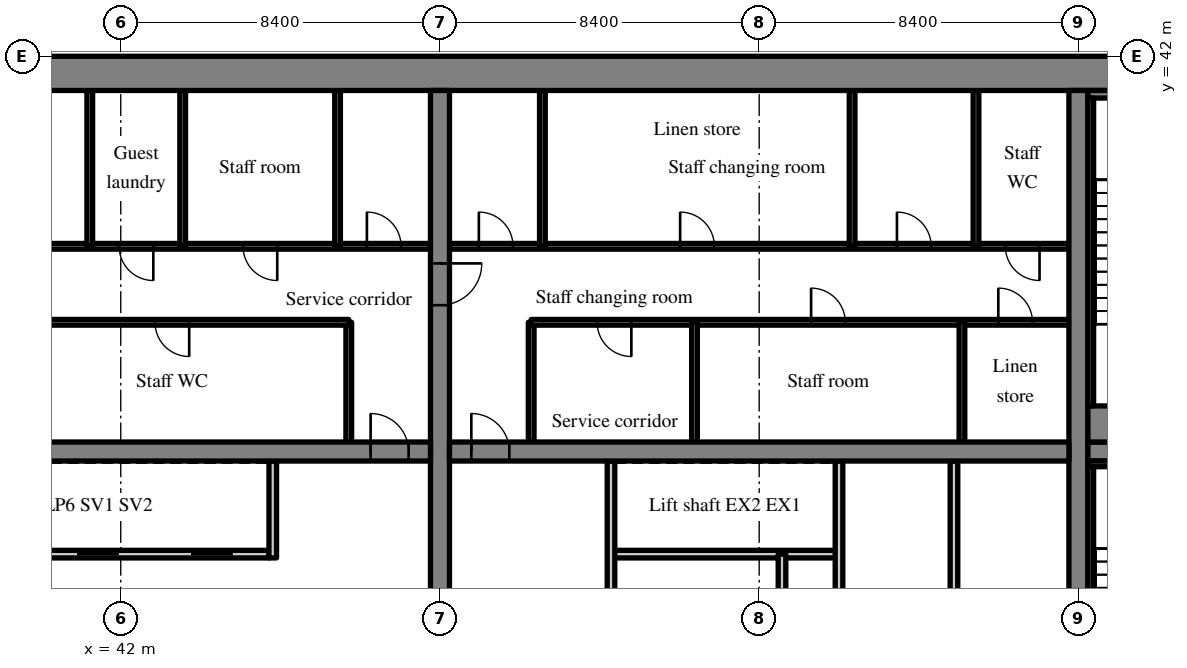
"""IFC4 building model, lengths in metres.
Left out: names, types, materials, properties, quantities, classifications, styles, units other than length and angle.
Written with IfcOpenShell. Run it as: python <this file> out.ifc"""

import sys

from ifc_helpers import new_model, si_unit, direction, frame, frame_2d, origin, place, context, subcontext, project, spatial, rectangle, extrude, source, transform, mapped, element, fill, save


model = new_model("IFC4")
c1 = context("Model", 3, precision=1e-05, world=origin(), true_north=direction((0.0, 1.0)))
c2 = subcontext(c1, "Body", "Model", "MODEL_VIEW")
j1 = project(units=[si_unit("LENGTHUNIT", "METRE"), si_unit("PLANEANGLEUNIT", "RADIAN")], contexts=[c1])
p1 = place(None, origin())
s1 = spatial("IfcSite", under=j1, at=p1, CompositionType="ELEMENT")
p2 = place(p1, origin())
s2 = spatial("IfcBuilding", under=s1, at=p2, CompositionType="ELEMENT")
p3 = place(p2, frame((0.0, 0.0, 95.2)))
s3 = spatial("IfcBuildingStorey", under=s2, at=p3, CompositionType="ELEMENT", Elevation=95.2)
m1 = source(origin(), c2, "Body", "SweptSolid", [
    extrude(rectangle(XDim=50.4, YDim=0.9, at=frame_2d((25.2, 0.0))), origin(), (0.0, 0.0, 1.0), 3.52),
])
p4 = place(p3, frame((25.2, 41.55, 0.0), z_axis=(0.0, 0.0, 1.0), x_axis=(1.0, 0.0, 0.0)))
e1 = element("IfcWall", 1, at=p4, inside=s3, PredefinedType="SHEAR", context=c2, shape_type="MappedRepresentation", body=[
    mapped(m1, transform((0.0, 0.0, 0.0), scale=1.0)),
])
m2 = source(origin(), c2, "Body", "SweptSolid", [
    extrude(rectangle(XDim=18.2, YDim=0.5, at=frame_2d((9.1, 0.0))), origin(), (0.0, 0.0, 1.0), 3.52),
])
p5 = place(p3, frame((50.4, 22.9, 0.0), z_axis=(0.0, 0.0, 1.0), x_axis=(0.0, 1.0, 0.0)))
e2 = element("IfcWall", 2, at=p5, inside=s3, PredefinedType="SHEAR", context=c2, shape_type="MappedRepresentation", body=[
    mapped(m2, transform((0.0, 0.0, 0.0), scale=1.0)),
])
m3 = source(origin(), c2, "Body", "SweptSolid", [
    extrude(rectangle(XDim=1.1, YDim=2.1, at=frame_2d((0.55, 1.05))), frame((0.0, 0.26, 0.0), z_axis=(0.0, -1.0, 0.0), x_axis=(1.0, 0.0, 0.0)), (0.0, 0.0, 1.0), 0.52),
])
p6 = place(p5, frame((12.55, 0.0, 0.0)))
e3 = element("IfcOpeningElement", 3, at=p6, cuts=e2, PredefinedType="OPENING", context=c2, shape_type="MappedRepresentation", body=[
    mapped(m3, transform((0.0, 0.0, 0.0), scale=1.0)),
])
p7 = place(p3, frame((67.2, 22.9, 0.0), z_axis=(0.0, 0.0, 1.0), x_axis=(0.0, 1.0, 0.0)))
e4 = element("IfcWall", 4, at=p7, inside=s3, PredefinedType="SHEAR", context=c2, shape_type="MappedRepresentation", body=[
    mapped(m2, transform((0.0, 0.0, 0.0), scale=1.0)),
])
m4 = source(origin(), c2, "Body", "SweptSolid", [
    extrude(rectangle(XDim=16.3, YDim=0.5, at=frame_2d((8.15, 0.0))), origin(), (0.0, 0.0, 1.0), 3.52),
])
p8 = place(p3, frame((33.85, 31.6, 0.0), z_axis=(0.0, 0.0, 1.0), x_axis=(1.0, 0.0, 0.0)))
e5 = element("IfcWall", 5, at=p8, inside=s3, PredefinedType="SHEAR", context=c2, shape_type="MappedRepresentation", body=[
    mapped(m4, transform((0.0, 0.0, 0.0), scale=1.0)),
])
m5 = source(origin(), c2, "Body", "SweptSolid", [
    extrude(rectangle(XDim=1.0, YDim=2.1, at=frame_2d((0.5, 1.05))), frame((0.0, 0.26, 0.0), z_axis=(0.0, -1.0, 0.0), x_axis=(1.0, 0.0, 0.0)), (0.0, 0.0, 1.0), 0.52),
])
p9 = place(p8, frame((14.725, 0.0, 0.0)))
e6 = element("IfcOpeningElement", 6, at=p9, cuts=e5, PredefinedType="OPENING", context=c2, shape_type="MappedRepresentation", body=[
    mapped(m5, transform((0.0, 0.0, 0.0), scale=1.0)),
])
m6 = source(origin(), c2, "Body", "SweptSolid", [
    extrude(rectangle(XDim=16.3, YDim=0.5, at=frame_2d((8.15, 0.0))), origin(), (0.0, 0.0, 1.0), 3.52),
])
p10 = place(p3, frame((50.65, 31.6, 0.0), z_axis=(0.0, 0.0, 1.0), x_axis=(1.0, 0.0, 0.0)))
e7 = element("IfcWall", 7, at=p10, inside=s3, PredefinedType="SHEAR", context=c2, shape_type="MappedRepresentation", body=[
    mapped(m6, transform((0.0, 0.0, 0.0), scale=1.0)),
])
p11 = place(p10, frame((0.575, 0.0, 0.0)))
e8 = element("IfcOpeningElement", 8, at=p11, cuts=e7, PredefinedType="OPENING", context=c2, shape_type="MappedRepresentation", body=[
    mapped(m5, transform((0.0, 0.0, 0.0), scale=1.0)),
])
m7 = source(origin(), c2, "Body", "SweptSolid", [
    extrude(rectangle(XDim=7.25, YDim=0.5, at=frame_2d((3.625, 0.0))), origin(), (0.0, 0.0, 1.0), 3.52),
])
p12 = place(p3, frame((67.45, 31.6, 0.0), z_axis=(0.0, 0.0, 1.0), x_axis=(1.0, 0.0, 0.0)))
e9 = element("IfcWall", 9, at=p12, inside=s3, PredefinedType="SHEAR", context=c2, shape_type="MappedRepresentation", body=[
    mapped(m7, transform((0.0, 0.0, 0.0), scale=1.0)),
])
p13 = place(p12, frame((5.575, 0.0, 0.0)))
e10 = element("IfcOpeningElement", 10, at=p13, cuts=e9, PredefinedType="OPENING", context=c2, shape_type="MappedRepresentation", body=[
    mapped(m3, transform((0.0, 0.0, 0.0), scale=1.0)),
])
m8 = source(origin(), c2, "Body", "SweptSolid", [
    extrude(rectangle(XDim=12.05, YDim=0.2, at=frame_2d((6.025, 0.0))), origin(), (0.0, 0.0, 1.0), 3.52),
])
p14 = place(p3, frame((33.85, 28.9, 0.0), z_axis=(0.0, 0.0, 1.0), x_axis=(1.0, 0.0, 0.0)))
e11 = element("IfcWall", 11, at=p14, inside=s3, PredefinedType="SOLIDWALL", context=c2, shape_type="MappedRepresentation", body=[
    mapped(m8, transform((0.0, 0.0, 0.0), scale=1.0)),
])
m9 = source(origin(), c2, "Body", "SweptSolid", [
    extrude(rectangle(XDim=1.1, YDim=2.1, at=frame_2d((0.55, 1.05))), frame((0.0, 0.11, 0.0), z_axis=(0.0, -1.0, 0.0), x_axis=(1.0, 0.0, 0.0)), (0.0, 0.0, 1.0), 0.22),
])
p15 = place(p14, frame((1.0, 0.0, 0.0)))
e12 = element("IfcOpeningElement", 12, at=p15, cuts=e11, PredefinedType="OPENING", context=c2, shape_type="MappedRepresentation", body=[
    mapped(m9, transform((0.0, 0.0, 0.0), scale=1.0)),
])
p16 = place(p14, frame((4.0, 0.0, 0.0)))
e13 = element("IfcOpeningElement", 13, at=p16, cuts=e11, PredefinedType="OPENING", context=c2, shape_type="MappedRepresentation", body=[
    mapped(m9, transform((0.0, 0.0, 0.0), scale=1.0)),
])
p17 = place(p14, frame((7.0, 0.0, 0.0)))
e14 = element("IfcOpeningElement", 14, at=p17, cuts=e11, PredefinedType="OPENING", context=c2, shape_type="MappedRepresentation", body=[
    mapped(m9, transform((0.0, 0.0, 0.0), scale=1.0)),
])
p18 = place(p14, frame((10.0, 0.0, 0.0)))
e15 = element("IfcOpeningElement", 15, at=p18, cuts=e11, PredefinedType="OPENING", context=c2, shape_type="MappedRepresentation", body=[
    mapped(m9, transform((0.0, 0.0, 0.0), scale=1.0)),
])
m10 = source(origin(), c2, "Body", "SweptSolid", [
    extrude(rectangle(XDim=2.55, YDim=0.2, at=frame_2d((1.275, 0.0))), origin(), (0.0, 0.0, 1.0), 3.52),
])
p19 = place(p3, frame((46.0, 28.8, 0.0), z_axis=(0.0, 0.0, 1.0), x_axis=(0.0, 1.0, 0.0)))
e16 = element("IfcWall", 16, at=p19, inside=s3, PredefinedType="SOLIDWALL", context=c2, shape_type="MappedRepresentation", body=[
    mapped(m10, transform((0.0, 0.0, 0.0), scale=1.0)),
])
m11 = source(origin(), c2, "Body", "SweptSolid", [
    extrude(rectangle(XDim=3.15, YDim=0.15, at=frame_2d((1.575, 0.0))), origin(), (0.0, 0.0, 1.0), 3.52),
])
p20 = place(p3, frame((48.0, 31.85, 0.0), z_axis=(0.0, 0.0, 1.0), x_axis=(0.0, 1.0, 0.0)))
e17 = element("IfcWall", 17, at=p20, inside=s3, PredefinedType="PARTITIONING", context=c2, shape_type="MappedRepresentation", body=[
    mapped(m11, transform((0.0, 0.0, 0.0), scale=1.0)),
])
m12 = source(origin(), c2, "Body", "SweptSolid", [
    extrude(rectangle(XDim=14.15, YDim=0.15, at=frame_2d((7.075, 0.0))), origin(), (0.0, 0.0, 1.0), 3.52),
])
p21 = place(p3, frame((33.85, 35.0, 0.0), z_axis=(0.0, 0.0, 1.0), x_axis=(1.0, 0.0, 0.0)))
e18 = element("IfcWall", 18, at=p21, inside=s3, PredefinedType="PARTITIONING", context=c2, shape_type="MappedRepresentation", body=[
    mapped(m12, transform((0.0, 0.0, 0.0), scale=1.0)),
])
m13 = source(origin(), c2, "Body", "SweptSolid", [
    extrude(rectangle(XDim=0.9, YDim=2.1, at=frame_2d((0.45, 1.05))), frame((0.0, 0.085, 0.0), z_axis=(0.0, -1.0, 0.0), x_axis=(1.0, 0.0, 0.0)), (0.0, 0.0, 1.0), 0.17),
])
p22 = place(p21, frame((2.013, 0.0, 0.0)))
e19 = element("IfcOpeningElement", 19, at=p22, cuts=e18, PredefinedType="OPENING", context=c2, shape_type="MappedRepresentation", body=[
    mapped(m13, transform((0.0, 0.0, 0.0), scale=1.0)),
])
p23 = place(p21, frame((9.051, 0.0, 0.0)))
e20 = element("IfcOpeningElement", 20, at=p23, cuts=e18, PredefinedType="OPENING", context=c2, shape_type="MappedRepresentation", body=[
    mapped(m13, transform((0.0, 0.0, 0.0), scale=1.0)),
])
m14 = source(origin(), c2, "Body", "SweptSolid", [
    extrude(rectangle(XDim=16.3, YDim=0.15, at=frame_2d((8.15, 0.0))), origin(), (0.0, 0.0, 1.0), 3.52),
])
p24 = place(p3, frame((33.85, 37.0, 0.0), z_axis=(0.0, 0.0, 1.0), x_axis=(1.0, 0.0, 0.0)))
e21 = element("IfcWall", 21, at=p24, inside=s3, PredefinedType="PARTITIONING", context=c2, shape_type="MappedRepresentation", body=[
    mapped(m14, transform((0.0, 0.0, 0.0), scale=1.0)),
])
p25 = place(p24, frame((3.217, 0.0, 0.0)))
e22 = element("IfcOpeningElement", 22, at=p25, cuts=e21, PredefinedType="OPENING", context=c2, shape_type="MappedRepresentation", body=[
    mapped(m13, transform((0.0, 0.0, 0.0), scale=1.0)),
])
p26 = place(p24, frame((8.107, 0.0, 0.0)))
e23 = element("IfcOpeningElement", 23, at=p26, cuts=e21, PredefinedType="OPENING", context=c2, shape_type="MappedRepresentation", body=[
    mapped(m13, transform((0.0, 0.0, 0.0), scale=1.0)),
])
p27 = place(p24, frame((11.368, 0.0, 0.0)))
e24 = element("IfcOpeningElement", 24, at=p27, cuts=e21, PredefinedType="OPENING", context=c2, shape_type="MappedRepresentation", body=[
    mapped(m13, transform((0.0, 0.0, 0.0), scale=1.0)),
])
p28 = place(p24, frame((14.627, 0.0, 0.0)))
e25 = element("IfcOpeningElement", 25, at=p28, cuts=e21, PredefinedType="OPENING", context=c2, shape_type="MappedRepresentation", body=[
    mapped(m13, transform((0.0, 0.0, 0.0), scale=1.0)),
])
m15 = source(origin(), c2, "Body", "SweptSolid", [
    extrude(rectangle(XDim=4.1, YDim=0.15, at=frame_2d((2.05, 0.0))), origin(), (0.0, 0.0, 1.0), 3.52),
])
for number, where, z_axis, x_axis in (
    (26, (41.185, 37.0, 0.0), (0.0, 0.0, 1.0), (0.0, 1.0, 0.0)),
    (27, (43.63, 37.0, 0.0), (0.0, 0.0, 1.0), (0.0, 1.0, 0.0)),
    (28, (47.705, 37.0, 0.0), (0.0, 0.0, 1.0), (0.0, 1.0, 0.0)),
):
    element("IfcWall", number, at=place(p3, frame(where, z_axis=z_axis, x_axis=x_axis)), inside=s3, PredefinedType="PARTITIONING", context=c2, shape_type="MappedRepresentation", body=[
        mapped(m15, transform((0.0, 0.0, 0.0), scale=1.0)),
    ])
m16 = source(origin(), c2, "Body", "SweptSolid", [
    extrude(rectangle(XDim=6.0, YDim=0.2, at=frame_2d((3.0, 0.0))), origin(), (0.0, 0.0, 1.0), 3.52),
])
p29 = place(p3, frame((60.9, 28.9, 0.0), z_axis=(0.0, 0.0, 1.0), x_axis=(-1.0, 0.0, 0.0)))
e29 = element("IfcWall", 29, at=p29, inside=s3, PredefinedType="SOLIDWALL", context=c2, shape_type="MappedRepresentation", body=[
    mapped(m16, transform((0.0, 0.0, 0.0), scale=1.0)),
])
m17 = source(origin(), c2, "Body", "SweptSolid", [
    extrude(rectangle(XDim=8.45, YDim=0.2, at=frame_2d((4.225, 0.0))), origin(), (0.0, 0.0, 1.0), 3.52),
])
for number, where, z_axis, x_axis in (
    (30, (54.9, 22.9, 0.0), (0.0, 0.0, 1.0), (0.0, 1.0, 0.0)),
    (31, (60.9, 22.9, 0.0), (0.0, 0.0, 1.0), (0.0, 1.0, 0.0)),
):
    element("IfcWall", number, at=place(p3, frame(where, z_axis=z_axis, x_axis=x_axis)), inside=s3, PredefinedType="PARTITIONING", context=c2, shape_type="MappedRepresentation", body=[
        mapped(m17, transform((0.0, 0.0, 0.0), scale=1.0)),
    ])
p30 = place(p3, frame((59.4, 22.9, 0.0), z_axis=(0.0, 0.0, 1.0), x_axis=(0.0, 1.0, 0.0)))
e32 = element("IfcWall", 32, at=p30, inside=s3, PredefinedType="PARTITIONING", context=c2, shape_type="MappedRepresentation", body=[
    mapped(m16, transform((0.0, 0.0, 0.0), scale=1.0)),
])
p31 = place(p3, frame((63.925, 22.9, 0.0), z_axis=(0.0, 0.0, 1.0), x_axis=(0.0, 1.0, 0.0)))
e33 = element("IfcWall", 33, at=p31, inside=s3, PredefinedType="PARTITIONING", context=c2, shape_type="MappedRepresentation", body=[
    mapped(m17, transform((0.0, 0.0, 0.0), scale=1.0)),
])
p32 = place(p3, frame((52.8, 31.85, 0.0), z_axis=(0.0, 0.0, 1.0), x_axis=(0.0, 1.0, 0.0)))
e34 = element("IfcWall", 34, at=p32, inside=s3, PredefinedType="PARTITIONING", context=c2, shape_type="MappedRepresentation", body=[
    mapped(m11, transform((0.0, 0.0, 0.0), scale=1.0)),
])
p33 = place(p3, frame((66.95, 35.0, 0.0), z_axis=(0.0, 0.0, 1.0), x_axis=(-1.0, 0.0, 0.0)))
e35 = element("IfcWall", 35, at=p33, inside=s3, PredefinedType="PARTITIONING", context=c2, shape_type="MappedRepresentation", body=[
    mapped(m12, transform((0.0, 0.0, 0.0), scale=1.0)),
])
p34 = place(p33, frame((0.958, 0.0, 0.0)))
e36 = element("IfcOpeningElement", 36, at=p34, cuts=e35, PredefinedType="OPENING", context=c2, shape_type="MappedRepresentation", body=[
    mapped(m13, transform((0.0, 0.0, 0.0), scale=1.0)),
])
p35 = place(p33, frame((5.884, 0.0, 0.0)))
e37 = element("IfcOpeningElement", 37, at=p35, cuts=e35, PredefinedType="OPENING", context=c2, shape_type="MappedRepresentation", body=[
    mapped(m13, transform((0.0, 0.0, 0.0), scale=1.0)),
])
p36 = place(p33, frame((11.514, 0.0, 0.0)))
e38 = element("IfcOpeningElement", 38, at=p36, cuts=e35, PredefinedType="OPENING", context=c2, shape_type="MappedRepresentation", body=[
    mapped(m13, transform((0.0, 0.0, 0.0), scale=1.0)),
])
m18 = source(origin(), c2, "Body", "SweptSolid", [
    extrude(rectangle(XDim=16.3, YDim=0.15, at=frame_2d((8.15, 0.0))), origin(), (0.0, 0.0, 1.0), 3.52),
])
p37 = place(p3, frame((66.95, 37.0, 0.0), z_axis=(0.0, 0.0, 1.0), x_axis=(-1.0, 0.0, 0.0)))
e39 = element("IfcWall", 39, at=p37, inside=s3, PredefinedType="PARTITIONING", context=c2, shape_type="MappedRepresentation", body=[
    mapped(m18, transform((0.0, 0.0, 0.0), scale=1.0)),
])
p38 = place(p37, frame((0.773, 0.0, 0.0)))
e40 = element("IfcOpeningElement", 40, at=p38, cuts=e39, PredefinedType="OPENING", context=c2, shape_type="MappedRepresentation", body=[
    mapped(m13, transform((0.0, 0.0, 0.0), scale=1.0)),
])
p39 = place(p37, frame((3.625, 0.0, 0.0)))
e41 = element("IfcOpeningElement", 41, at=p39, cuts=e39, PredefinedType="OPENING", context=c2, shape_type="MappedRepresentation", body=[
    mapped(m13, transform((0.0, 0.0, 0.0), scale=1.0)),
])
p40 = place(p37, frame((9.33, 0.0, 0.0)))
e42 = element("IfcOpeningElement", 42, at=p40, cuts=e39, PredefinedType="OPENING", context=c2, shape_type="MappedRepresentation", body=[
    mapped(m13, transform((0.0, 0.0, 0.0), scale=1.0)),
])
p41 = place(p37, frame((14.627, 0.0, 0.0)))
e43 = element("IfcOpeningElement", 43, at=p41, cuts=e39, PredefinedType="OPENING", context=c2, shape_type="MappedRepresentation", body=[
    mapped(m13, transform((0.0, 0.0, 0.0), scale=1.0)),
])
for number, where, z_axis, x_axis in (
    (44, (64.135, 31.85, 0.0), (0.0, 0.0, 1.0), (0.0, 1.0, 0.0)),
    (45, (57.097, 31.85, 0.0), (0.0, 0.0, 1.0), (0.0, 1.0, 0.0)),
):
    element("IfcWall", number, at=place(p3, frame(where, z_axis=z_axis, x_axis=x_axis)), inside=s3, PredefinedType="PARTITIONING", context=c2, shape_type="MappedRepresentation", body=[
        mapped(m11, transform((0.0, 0.0, 0.0), scale=1.0)),
    ])
for number, where, z_axis, x_axis in (
    (46, (64.505, 37.0, 0.0), (0.0, 0.0, 1.0), (0.0, 1.0, 0.0)),
    (47, (61.245, 37.0, 0.0), (0.0, 0.0, 1.0), (0.0, 1.0, 0.0)),
    (48, (53.095, 37.0, 0.0), (0.0, 0.0, 1.0), (0.0, 1.0, 0.0)),
):
    element("IfcWall", number, at=place(p3, frame(where, z_axis=z_axis, x_axis=x_axis)), inside=s3, PredefinedType="PARTITIONING", context=c2, shape_type="MappedRepresentation", body=[
        mapped(m15, transform((0.0, 0.0, 0.0), scale=1.0)),
    ])
m19 = source(origin(), c2, "Body", "SweptSolid", [
    extrude(rectangle(XDim=4.8, YDim=0.15, at=frame_2d((2.4, 0.0))), origin(), (0.0, 0.0, 1.0), 3.52),
])
p42 = place(p3, frame((67.45, 31.275, 0.0), z_axis=(0.0, 0.0, 1.0), x_axis=(1.0, 0.0, 0.0)))
e49 = element("IfcWall", 49, at=p42, inside=s3, PredefinedType="SOLIDWALL", context=c2, shape_type="MappedRepresentation", body=[
    mapped(m19, transform((0.0, 0.0, 0.0), scale=1.0)),
])
m20 = source(origin(), c2, "Body", "SweptSolid", [
    extrude(rectangle(XDim=8.1, YDim=0.15, at=frame_2d((4.05, 0.0))), origin(), (0.0, 0.0, 1.0), 3.52),
])
p43 = place(p3, frame((67.525, 23.1, 0.0), z_axis=(0.0, 0.0, 1.0), x_axis=(0.0, 1.0, 0.0)))
e50 = element("IfcWall", 50, at=p43, inside=s3, PredefinedType="SOLIDWALL", context=c2, shape_type="MappedRepresentation", body=[
    mapped(m20, transform((0.0, 0.0, 0.0), scale=1.0)),
])
m21 = source(origin(), c2, "Body", "SweptSolid", [
    extrude(rectangle(XDim=4.8, YDim=0.2, at=frame_2d((2.4, 0.0))), origin(), (0.0, 0.0, 1.0), 3.52),
])
p44 = place(p3, frame((67.45, 41.0, 0.0), z_axis=(0.0, 0.0, 1.0), x_axis=(1.0, 0.0, 0.0)))
e51 = element("IfcWall", 51, at=p44, inside=s3, PredefinedType="SOLIDWALL", context=c2, shape_type="MappedRepresentation", body=[
    mapped(m21, transform((0.0, 0.0, 0.0), scale=1.0)),
])
m22 = source(origin(), c2, "Body", "SweptSolid", [
    extrude(rectangle(XDim=4.8, YDim=0.95, at=frame_2d((2.4, 0.0))), origin(), (0.0, 0.0, 1.0), 3.52),
])
p45 = place(p3, frame((67.45, 32.325, 0.0), z_axis=(0.0, 0.0, 1.0), x_axis=(1.0, 0.0, 0.0)))
e52 = element("IfcWall", 52, at=p45, inside=s3, PredefinedType="SOLIDWALL", context=c2, shape_type="MappedRepresentation", body=[
    mapped(m22, transform((0.0, 0.0, 0.0), scale=1.0)),
])
p46 = place(p3, frame((67.525, 32.8, 0.0), z_axis=(0.0, 0.0, 1.0), x_axis=(0.0, 1.0, 0.0)))
e53 = element("IfcWall", 53, at=p46, inside=s3, PredefinedType="SOLIDWALL", context=c2, shape_type="MappedRepresentation", body=[
    mapped(m20, transform((0.0, 0.0, 0.0), scale=1.0)),
])
m23 = source(origin(), c2, "Body", "SweptSolid", [
    extrude(rectangle(XDim=1.0, YDim=2.1, at=frame_2d((0.5, 1.05))), frame((0.0, 0.025, 0.0), z_axis=(0.0, -1.0, 0.0), x_axis=(1.0, 0.0, 0.0)), (0.0, 0.0, 1.0), 0.05),
])
p47 = place(p9, origin())
e54 = element("IfcDoor", 54, at=p47, inside=s3, OperationType="SINGLE_SWING_LEFT", PredefinedType="DOOR", context=c2, shape_type="MappedRepresentation", body=[
    mapped(m23, transform((0.0, 0.0, 0.0), scale=1.0)),
])
fill(e6, e54)
m24 = source(origin(), c2, "Body", "SweptSolid", [
    extrude(rectangle(XDim=1.1, YDim=2.1, at=frame_2d((0.55, 1.05))), frame((0.0, 0.025, 0.0), z_axis=(0.0, -1.0, 0.0), x_axis=(1.0, 0.0, 0.0)), (0.0, 0.0, 1.0), 0.05),
])
p48 = place(p17, origin())
e55 = element("IfcDoor", 55, at=p48, inside=s3, OperationType="SLIDING_TO_LEFT", PredefinedType="DOOR", context=c2, shape_type="MappedRepresentation", body=[
    mapped(m24, transform((0.0, 0.0, 0.0), scale=1.0)),
])
fill(e14, e55)
p49 = place(p18, origin())
e56 = element("IfcDoor", 56, at=p49, inside=s3, OperationType="SLIDING_TO_RIGHT", PredefinedType="DOOR", context=c2, shape_type="MappedRepresentation", body=[
    mapped(m24, transform((0.0, 0.0, 0.0), scale=1.0)),
])
fill(e15, e56)
m25 = source(origin(), c2, "Body", "SweptSolid", [
    extrude(rectangle(XDim=0.9, YDim=2.1, at=frame_2d((0.45, 1.05))), frame((0.0, 0.025, 0.0), z_axis=(0.0, -1.0, 0.0), x_axis=(1.0, 0.0, 0.0)), (0.0, 0.0, 1.0), 0.05),
])
p50 = place(p23, origin())
e57 = element("IfcDoor", 57, at=p50, inside=s3, OperationType="SINGLE_SWING_RIGHT", PredefinedType="DOOR", context=c2, shape_type="MappedRepresentation", body=[
    mapped(m25, transform((0.0, 0.0, 0.0), scale=1.0)),
])
fill(e20, e57)
p51 = place(p26, origin())
e58 = element("IfcDoor", 58, at=p51, inside=s3, OperationType="SINGLE_SWING_RIGHT", PredefinedType="DOOR", context=c2, shape_type="MappedRepresentation", body=[
    mapped(m25, transform((0.0, 0.0, 0.0), scale=1.0)),
])
fill(e23, e58)
p52 = place(p27, origin())
e59 = element("IfcDoor", 59, at=p52, inside=s3, OperationType="SINGLE_SWING_RIGHT", PredefinedType="DOOR", context=c2, shape_type="MappedRepresentation", body=[
    mapped(m25, transform((0.0, 0.0, 0.0), scale=1.0)),
])
fill(e24, e59)
p53 = place(p28, origin())
e60 = element("IfcDoor", 60, at=p53, inside=s3, OperationType="SINGLE_SWING_LEFT", PredefinedType="DOOR", context=c2, shape_type="MappedRepresentation", body=[
    mapped(m25, transform((0.0, 0.0, 0.0), scale=1.0)),
])
fill(e25, e60)
p54 = place(p11, origin())
e61 = element("IfcDoor", 61, at=p54, inside=s3, OperationType="SINGLE_SWING_LEFT", PredefinedType="DOOR", context=c2, shape_type="MappedRepresentation", body=[
    mapped(m23, transform((0.0, 0.0, 0.0), scale=1.0)),
])
fill(e8, e61)
p55 = place(p34, origin())
e62 = element("IfcDoor", 62, at=p55, inside=s3, OperationType="SINGLE_SWING_RIGHT", PredefinedType="DOOR", context=c2, shape_type="MappedRepresentation", body=[
    mapped(m25, transform((0.0, 0.0, 0.0), scale=1.0)),
])
fill(e36, e62)
p56 = place(p35, origin())
e63 = element("IfcDoor", 63, at=p56, inside=s3, OperationType="SINGLE_SWING_RIGHT", PredefinedType="DOOR", context=c2, shape_type="MappedRepresentation", body=[
    mapped(m25, transform((0.0, 0.0, 0.0), scale=1.0)),
])
fill(e37, e63)
p57 = place(p36, origin())
e64 = element("IfcDoor", 64, at=p57, inside=s3, OperationType="SINGLE_SWING_LEFT", PredefinedType="DOOR", context=c2, shape_type="MappedRepresentation", body=[
    mapped(m25, transform((0.0, 0.0, 0.0), scale=1.0)),
])
fill(e38, e64)
p58 = place(p38, origin())
e65 = element("IfcDoor", 65, at=p58, inside=s3, OperationType="SINGLE_SWING_LEFT", PredefinedType="DOOR", context=c2, shape_type="MappedRepresentation", body=[
    mapped(m25, transform((0.0, 0.0, 0.0), scale=1.0)),
])
fill(e40, e65)
p59 = place(p39, origin())
e66 = element("IfcDoor", 66, at=p59, inside=s3, OperationType="SINGLE_SWING_RIGHT", PredefinedType="DOOR", context=c2, shape_type="MappedRepresentation", body=[
    mapped(m25, transform((0.0, 0.0, 0.0), scale=1.0)),
])
fill(e41, e66)
p60 = place(p40, origin())
e67 = element("IfcDoor", 67, at=p60, inside=s3, OperationType="SINGLE_SWING_RIGHT", PredefinedType="DOOR", context=c2, shape_type="MappedRepresentation", body=[
    mapped(m25, transform((0.0, 0.0, 0.0), scale=1.0)),
])
fill(e42, e67)
p61 = place(p41, origin())
e68 = element("IfcDoor", 68, at=p61, inside=s3, OperationType="SINGLE_SWING_RIGHT", PredefinedType="DOOR", context=c2, shape_type="MappedRepresentation", body=[
    mapped(m25, transform((0.0, 0.0, 0.0), scale=1.0)),
])
fill(e43, e68)
p62 = place(p6, origin())
e69 = element("IfcDoor", 69, at=p62, inside=s3, OperationType="SINGLE_SWING_RIGHT", PredefinedType="DOOR", context=c2, shape_type="MappedRepresentation", body=[
    mapped(m24, transform((0.0, 0.0, 0.0), scale=1.0)),
])
fill(e3, e69)
save(model, sys.argv[1])
